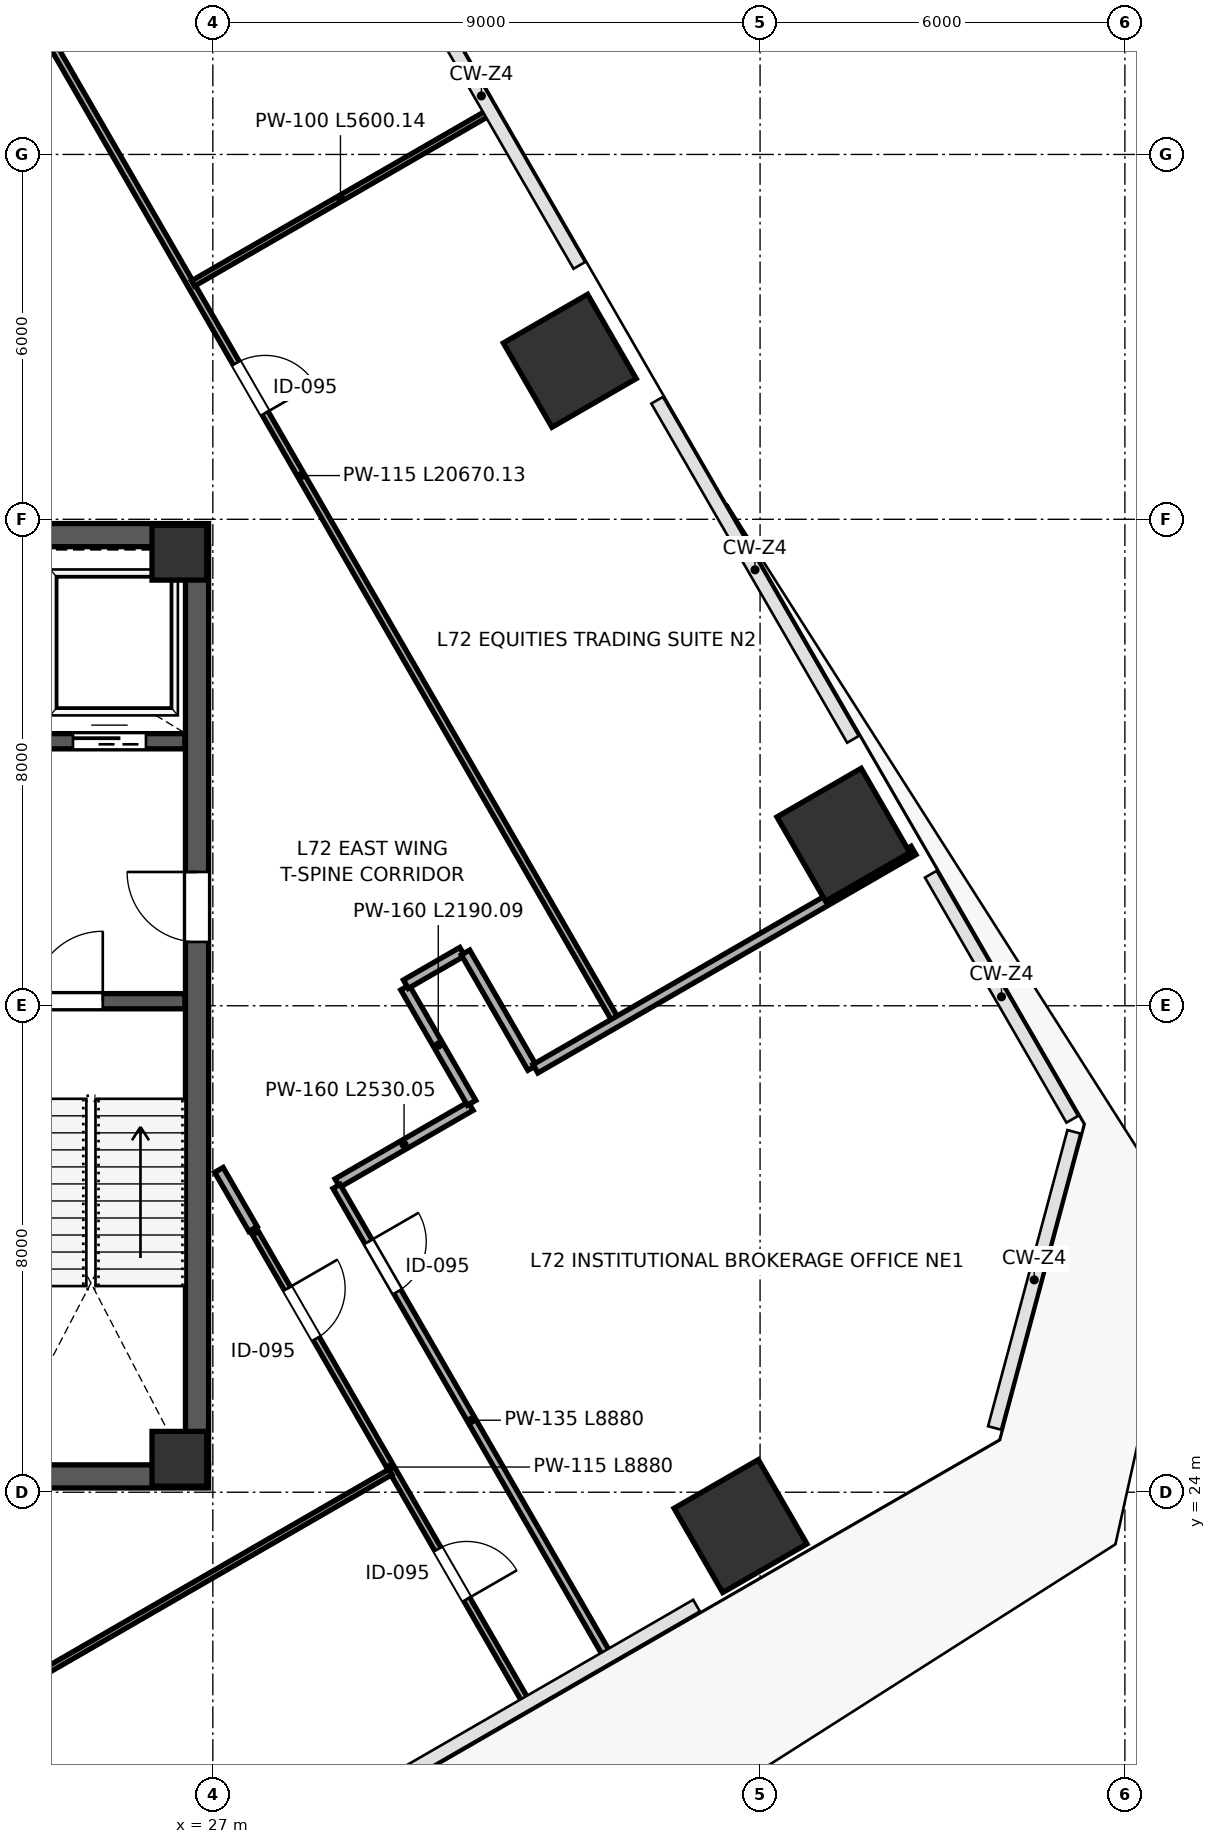
"""IFC4 building model, lengths in metres.
Left out: names, types, materials, properties, quantities, classifications, styles, units other than length and angle.
Written with IfcOpenShell. Run it as: python <this file> out.ifc"""

import sys

from ifc_helpers import new_model, si_unit, direction, frame, frame_2d, origin, origin_2d, place, context, subcontext, project, spatial, rectangle, extrude, source, transform, mapped, element, fill, save


model = new_model("IFC4")
c1 = context("Model", 3, precision=1e-05, world=origin(), true_north=direction((0.0, 1.0)))
c2 = subcontext(c1, "Body", "Model", "MODEL_VIEW")
j1 = project(units=[si_unit("LENGTHUNIT", "METRE"), si_unit("PLANEANGLEUNIT", "RADIAN")], contexts=[c1])
p1 = place(None, origin())
s1 = spatial("IfcSite", under=j1, at=p1, CompositionType="ELEMENT")
p2 = place(p1, origin())
s2 = spatial("IfcBuilding", under=s1, at=p2, CompositionType="ELEMENT")
p3 = place(p2, frame((0.0, 0.0, 319.8)))
s3 = spatial("IfcBuildingStorey", under=s2, at=p3, CompositionType="ELEMENT", Elevation=319.8)
m1 = source(origin(), c2, "Body", "SweptSolid", [
    extrude(rectangle(XDim=0.9, YDim=0.9, at=origin_2d()), origin(), (0.0, 0.0, 1.0), 4.198),
])
for number, where, z_axis, x_axis in (
    (1, (26.45, 24.55, 0.001), (0.0, 0.0, 1.0), (1.0, 0.0, 0.0)),
    (2, (26.45, 39.45, 0.001), (0.0, 0.0, 1.0), (1.0, 0.0, 0.0)),
):
    element("IfcColumn", number, at=place(p3, frame(where, z_axis=z_axis, x_axis=x_axis)), inside=s3, PredefinedType="COLUMN", context=c2, shape_type="MappedRepresentation", body=[
        mapped(m1, transform((0.0, 0.0, 0.0), scale=1.0)),
    ])
m2 = source(origin(), c2, "Body", "SweptSolid", [
    extrude(rectangle(XDim=1.6, YDim=1.6, at=origin_2d()), origin(), (0.0, 0.0, 1.0), 4.198),
])
for number, where, z_axis, x_axis in (
    (3, (32.87, 42.606, 0.001), (0.0, 0.0, 1.0), (-0.5, 0.866, 0.0)),
    (4, (37.37, 34.812, 0.001), (0.0, 0.0, 1.0), (-0.5, 0.866, 0.0)),
    (5, (35.678, 23.443, 0.001), (0.0, 0.0, 1.0), (-0.5, 0.866, 0.0)),
):
    element("IfcColumn", number, at=place(p3, frame(where, z_axis=z_axis, x_axis=x_axis)), inside=s3, PredefinedType="COLUMN", context=c2, shape_type="MappedRepresentation", body=[
        mapped(m2, transform((0.0, 0.0, 0.0), scale=1.0)),
    ])
p4 = place(p3, frame((26.74, 24.45, 0.0), z_axis=(0.0, 0.0, 1.0), x_axis=(0.0, 1.0, 0.0)))
e6 = element("IfcWall", 6, at=p4, inside=s3, PredefinedType="SHEAR", context=c2, shape_type="SweptSolid", body=[
    extrude(rectangle(XDim=15.1, YDim=0.38, at=frame_2d((7.55, 0.0))), origin(), (0.0, 0.0, 1.0), 3.96),
])
p5 = place(p4, frame((8.6, 0.0, 0.0)))
e7 = element("IfcOpeningElement", 7, at=p5, cuts=e6, PredefinedType="OPENING", context=c2, shape_type="SweptSolid", body=[
    extrude(rectangle(XDim=1.15, YDim=2.2, at=frame_2d((0.575, 1.1))), frame((0.0, 0.2, 0.0), z_axis=(0.0, -1.0, 0.0), x_axis=(1.0, 0.0, 0.0)), (0.0, 0.0, 1.0), 0.4),
])
for number, where, z_axis, x_axis in (
    (8, (9.07, 24.26, 0.0), (0.0, 0.0, 1.0), (1.0, 0.0, 0.0)),
    (9, (9.07, 39.74, 0.0), (0.0, 0.0, 1.0), (1.0, 0.0, 0.0)),
):
    element("IfcWall", number, at=place(p3, frame(where, z_axis=z_axis, x_axis=x_axis)), inside=s3, PredefinedType="SHEAR", context=c2, shape_type="SweptSolid", body=[
        extrude(rectangle(XDim=17.86, YDim=0.38, at=frame_2d((8.93, 0.0))), origin(), (0.0, 0.0, 1.0), 3.96),
    ])
p6 = place(p3, frame((23.19, 32.075, 0.0), z_axis=(0.0, 0.0, 1.0), x_axis=(1.0, 0.0, 0.0)))
e10 = element("IfcWall", 10, at=p6, inside=s3, PredefinedType="SHEAR", context=c2, shape_type="SweptSolid", body=[
    extrude(rectangle(XDim=3.35, YDim=0.25, at=frame_2d((1.675, 0.0))), origin(), (0.0, 0.0, 1.0), 3.96),
])
p7 = place(p6, frame((0.85, 0.0, 0.0)))
e11 = element("IfcOpeningElement", 11, at=p7, cuts=e10, PredefinedType="OPENING", context=c2, shape_type="SweptSolid", body=[
    extrude(rectangle(XDim=1.15, YDim=2.2, at=frame_2d((0.575, 1.1))), frame((0.0, 0.135, 0.0), z_axis=(0.0, -1.0, 0.0), x_axis=(1.0, 0.0, 0.0)), (0.0, 0.0, 1.0), 0.27),
])
p8 = place(p3, frame((21.45, 36.35, 0.0), z_axis=(0.0, 0.0, 1.0), x_axis=(1.0, 0.0, 0.0)))
e12 = element("IfcWall", 12, at=p8, inside=s3, PredefinedType="SHEAR", context=c2, shape_type="SweptSolid", body=[
    extrude(rectangle(XDim=5.09, YDim=0.25, at=frame_2d((2.545, 0.0))), origin(), (0.0, 0.0, 1.0), 3.96),
])
p9 = place(p8, frame((0.7, 0.0, 0.0)))
e13 = element("IfcOpeningElement", 13, at=p9, cuts=e12, PredefinedType="OPENING", context=c2, shape_type="SweptSolid", body=[
    extrude(rectangle(XDim=1.2, YDim=2.2, at=frame_2d((0.6, 1.1))), frame((0.0, 0.135, 0.0), z_axis=(0.0, -1.0, 0.0), x_axis=(1.0, 0.0, 0.0)), (0.0, 0.0, 1.0), 0.27),
])
p10 = place(p8, frame((3.25, 0.0, 0.0)))
e14 = element("IfcOpeningElement", 14, at=p10, cuts=e12, PredefinedType="OPENING", context=c2, shape_type="SweptSolid", body=[
    extrude(rectangle(XDim=1.2, YDim=2.2, at=frame_2d((0.6, 1.1))), frame((0.0, 0.135, 0.0), z_axis=(0.0, -1.0, 0.0), x_axis=(1.0, 0.0, 0.0)), (0.0, 0.0, 1.0), 0.27),
])
p11 = place(p3, frame((27.1, 29.301, 0.0), z_axis=(0.0, 0.0, 1.0), x_axis=(0.499929606556, -0.866066041644, 0.0)))
e15 = element("IfcWall", 15, at=p11, inside=s3, PredefinedType="PARTITIONING", context=c2, shape_type="SweptSolid", body=[
    extrude(rectangle(XDim=1.122, YDim=0.16, at=frame_2d((0.561, 0.0))), origin(), (0.0, 0.0, 1.0), 3.96),
])
p12 = place(p3, frame((23.284, 49.669, 0.0), z_axis=(0.0, 0.0, 1.0), x_axis=(0.500004637929, -0.866022726058, 0.0)))
e16 = element("IfcWall", 16, at=p12, inside=s3, PredefinedType="PARTITIONING", context=c2, shape_type="SweptSolid", body=[
    extrude(rectangle(XDim=20.67, YDim=0.115, at=frame_2d((10.335, 0.0))), origin(), (0.0, 0.0, 1.0), 3.96),
])
p13 = place(p12, frame((1.05, 0.0, 0.0)))
e17 = element("IfcOpeningElement", 17, at=p13, cuts=e16, PredefinedType="OPENING", context=c2, shape_type="SweptSolid", body=[
    extrude(rectangle(XDim=0.95, YDim=2.15, at=frame_2d((0.475, 1.075))), frame((0.0, 0.067, 0.0), z_axis=(0.0, -1.0, 0.0), x_axis=(1.0, 0.0, 0.0)), (0.0, 0.0, 1.0), 0.135),
])
p14 = place(p12, frame((8.2, 0.0, 0.0)))
e18 = element("IfcOpeningElement", 18, at=p14, cuts=e16, PredefinedType="OPENING", context=c2, shape_type="SweptSolid", body=[
    extrude(rectangle(XDim=0.95, YDim=2.15, at=frame_2d((0.475, 1.075))), frame((0.0, 0.067, 0.0), z_axis=(0.0, -1.0, 0.0), x_axis=(1.0, 0.0, 0.0)), (0.0, 0.0, 1.0), 0.135),
])
p15 = place(p3, frame((26.674, 43.878, 0.0), z_axis=(0.0, 0.0, 1.0), x_axis=(0.866026594901, 0.49999793692, 0.0)))
e19 = element("IfcWall", 19, at=p15, inside=s3, PredefinedType="PARTITIONING", context=c2, shape_type="SweptSolid", body=[
    extrude(rectangle(XDim=5.6, YDim=0.1, at=frame_2d((2.8, 0.0))), origin(), (0.0, 0.0, 1.0), 3.295),
])
p16 = place(p3, frame((2.506, 37.719, 0.0), z_axis=(0.0, 0.0, 1.0), x_axis=(0.866023290802, 0.500003659775, 0.0)))
e20 = element("IfcWall", 20, at=p16, inside=s3, PredefinedType="PARTITIONING", context=c2, shape_type="SweptSolid", body=[
    extrude(rectangle(XDim=29.61, YDim=0.115, at=frame_2d((14.805, 0.0))), origin(), (0.0, 0.0, 1.0), 3.96),
])
p17 = place(p16, frame((2.1, 0.0, 0.0)))
e21 = element("IfcOpeningElement", 21, at=p17, cuts=e20, PredefinedType="OPENING", context=c2, shape_type="SweptSolid", body=[
    extrude(rectangle(XDim=0.95, YDim=2.15, at=frame_2d((0.475, 1.075))), frame((0.0, 0.067, 0.0), z_axis=(0.0, -1.0, 0.0), x_axis=(1.0, 0.0, 0.0)), (0.0, 0.0, 1.0), 0.135),
])
p18 = place(p16, frame((11.8, 0.0, 0.0)))
e22 = element("IfcOpeningElement", 22, at=p18, cuts=e20, PredefinedType="OPENING", context=c2, shape_type="SweptSolid", body=[
    extrude(rectangle(XDim=0.95, YDim=2.15, at=frame_2d((0.475, 1.075))), frame((0.0, 0.067, 0.0), z_axis=(0.0, -1.0, 0.0), x_axis=(1.0, 0.0, 0.0)), (0.0, 0.0, 1.0), 0.135),
])
p19 = place(p3, frame((29.049, 29.084, 0.0), z_axis=(0.0, 0.0, 1.0), x_axis=(0.866013648801, 0.500020359676, 0.0)))
e23 = element("IfcWall", 23, at=p19, inside=s3, PredefinedType="PARTITIONING", context=c2, shape_type="SweptSolid", body=[
    extrude(rectangle(XDim=2.53, YDim=0.16, at=frame_2d((1.265, 0.0))), origin(), (0.0, 0.0, 1.0), 3.96),
])
p20 = place(p3, frame((30.16, 32.3, 0.0), z_axis=(0.0, 0.0, 1.0), x_axis=(0.499963694393, -0.866046363822, 0.0)))
e24 = element("IfcWall", 24, at=p20, inside=s3, PredefinedType="PARTITIONING", context=c2, shape_type="SweptSolid", body=[
    extrude(rectangle(XDim=2.19, YDim=0.16, at=frame_2d((1.095, 0.0))), origin(), (0.0, 0.0, 1.0), 3.96),
])
p21 = place(p3, frame((30.175, 32.355, 0.0), z_axis=(0.0, 0.0, 1.0), x_axis=(0.866029778435, 0.499992422807, 0.0)))
e25 = element("IfcWall", 25, at=p21, inside=s3, PredefinedType="PARTITIONING", context=c2, shape_type="SweptSolid", body=[
    extrude(rectangle(XDim=1.07, YDim=0.16, at=frame_2d((0.535, 0.0))), origin(), (0.0, 0.0, 1.0), 3.96),
])
p22 = place(p3, frame((31.156, 32.875, 0.0), z_axis=(0.0, 0.0, 1.0), x_axis=(0.499963694393, -0.866046363822, 0.0)))
e26 = element("IfcWall", 26, at=p22, inside=s3, PredefinedType="PARTITIONING", context=c2, shape_type="SweptSolid", body=[
    extrude(rectangle(XDim=2.19, YDim=0.16, at=frame_2d((1.095, 0.0))), origin(), (0.0, 0.0, 1.0), 3.96),
])
p23 = place(p3, frame((32.306, 30.964, 0.0), z_axis=(0.0, 0.0, 1.0), x_axis=(0.866033266336, 0.499986381413, 0.0)))
e27 = element("IfcWall", 27, at=p23, inside=s3, PredefinedType="PARTITIONING", context=c2, shape_type="SweptSolid", body=[
    extrude(rectangle(XDim=7.18, YDim=0.16, at=frame_2d((3.59, 0.0))), origin(), (0.0, 0.0, 1.0), 3.96),
])
p24 = place(p3, frame((29.035, 29.029, 0.0), z_axis=(0.0, 0.0, 1.0), x_axis=(0.500000904628, -0.866024881496, 0.0)))
e28 = element("IfcWall", 28, at=p24, inside=s3, PredefinedType="PARTITIONING", context=c2, shape_type="SweptSolid", body=[
    extrude(rectangle(XDim=8.88, YDim=0.135, at=frame_2d((4.44, 0.0))), origin(), (0.0, 0.0, 1.0), 3.96),
])
p25 = place(p24, frame((1.05, 0.0, 0.0)))
e29 = element("IfcOpeningElement", 29, at=p25, cuts=e28, PredefinedType="OPENING", context=c2, shape_type="SweptSolid", body=[
    extrude(rectangle(XDim=0.95, YDim=2.15, at=frame_2d((0.475, 1.075))), frame((0.0, 0.078, 0.0), z_axis=(0.0, -1.0, 0.0), x_axis=(1.0, 0.0, 0.0)), (0.0, 0.0, 1.0), 0.155),
])
p26 = place(p3, frame((27.701, 28.26, 0.0), z_axis=(0.0, 0.0, 1.0), x_axis=(0.499988999718, -0.866031754707, 0.0)))
e30 = element("IfcWall", 30, at=p26, inside=s3, PredefinedType="PARTITIONING", context=c2, shape_type="SweptSolid", body=[
    extrude(rectangle(XDim=8.88, YDim=0.115, at=frame_2d((4.44, 0.0))), origin(), (0.0, 0.0, 1.0), 3.96),
])
p27 = place(p26, frame((1.05, 0.0, 0.0)))
e31 = element("IfcOpeningElement", 31, at=p27, cuts=e30, PredefinedType="OPENING", context=c2, shape_type="SweptSolid", body=[
    extrude(rectangle(XDim=0.95, YDim=2.15, at=frame_2d((0.475, 1.075))), frame((0.0, 0.067, 0.0), z_axis=(0.0, -1.0, 0.0), x_axis=(1.0, 0.0, 0.0)), (0.0, 0.0, 1.0), 0.135),
])
p28 = place(p26, frame((6.0, 0.0, 0.0)))
e32 = element("IfcOpeningElement", 32, at=p28, cuts=e30, PredefinedType="OPENING", context=c2, shape_type="SweptSolid", body=[
    extrude(rectangle(XDim=0.95, YDim=2.15, at=frame_2d((0.475, 1.075))), frame((0.0, 0.067, 0.0), z_axis=(0.0, -1.0, 0.0), x_axis=(1.0, 0.0, 0.0)), (0.0, 0.0, 1.0), 0.135),
])
p29 = place(p3, frame((13.917, 15.094, 0.0), z_axis=(0.0, 0.0, 1.0), x_axis=(0.86602564517, 0.499999581907, 0.0)))
e33 = element("IfcWall", 33, at=p29, inside=s3, PredefinedType="PARTITIONING", context=c2, shape_type="SweptSolid", body=[
    extrude(rectangle(XDim=18.48, YDim=0.1, at=frame_2d((9.24, 0.0))), origin(), (0.0, 0.0, 1.0), 3.96),
])
m3 = source(origin(), c2, "Body", "SweptSolid", [
    extrude(rectangle(XDim=1.15, YDim=2.2, at=frame_2d((0.575, 1.1))), frame((0.0, 0.025, 0.0), z_axis=(0.0, -1.0, 0.0), x_axis=(1.0, 0.0, 0.0)), (0.0, 0.0, 1.0), 0.05),
])
p30 = place(p7, origin())
e34 = element("IfcDoor", 34, at=p30, inside=s3, OperationType="SINGLE_SWING_RIGHT", PredefinedType="DOOR", context=c2, shape_type="MappedRepresentation", body=[
    mapped(m3, transform((0.0, 0.0, 0.0), scale=1.0)),
])
fill(e11, e34)
m4 = source(origin(), c2, "Body", "SweptSolid", [
    extrude(rectangle(XDim=1.15, YDim=2.2, at=frame_2d((0.575, 1.1))), frame((0.0, 0.025, 0.0), z_axis=(0.0, -1.0, 0.0), x_axis=(1.0, 0.0, 0.0)), (0.0, 0.0, 1.0), 0.05),
])
p31 = place(p5, origin())
e35 = element("IfcDoor", 35, at=p31, inside=s3, OperationType="SINGLE_SWING_RIGHT", PredefinedType="DOOR", context=c2, shape_type="MappedRepresentation", body=[
    mapped(m4, transform((0.0, 0.0, 0.0), scale=1.0)),
])
fill(e7, e35)
m5 = source(origin(), c2, "Body", "SweptSolid", [
    extrude(rectangle(XDim=1.2, YDim=2.2, at=frame_2d((0.6, 1.1))), frame((0.0, 0.025, 0.0), z_axis=(0.0, -1.0, 0.0), x_axis=(1.0, 0.0, 0.0)), (0.0, 0.0, 1.0), 0.05),
])
p32 = place(p10, origin())
e36 = element("IfcDoor", 36, at=p32, inside=s3, OperationType="SLIDING_TO_RIGHT", PredefinedType="DOOR", context=c2, shape_type="MappedRepresentation", body=[
    mapped(m5, transform((0.0, 0.0, 0.0), scale=1.0)),
])
fill(e14, e36)
m6 = source(origin(), c2, "Body", "SweptSolid", [
    extrude(rectangle(XDim=0.95, YDim=2.15, at=frame_2d((0.475, 1.075))), frame((0.0, 0.025, 0.0), z_axis=(0.0, -1.0, 0.0), x_axis=(1.0, 0.0, 0.0)), (0.0, 0.0, 1.0), 0.05),
])
p33 = place(p14, origin())
e37 = element("IfcDoor", 37, at=p33, inside=s3, OperationType="SINGLE_SWING_RIGHT", PredefinedType="DOOR", context=c2, shape_type="MappedRepresentation", body=[
    mapped(m6, transform((0.0, 0.0, 0.0), scale=1.0)),
])
fill(e18, e37)
p34 = place(p25, origin())
e38 = element("IfcDoor", 38, at=p34, inside=s3, OperationType="SINGLE_SWING_LEFT", PredefinedType="DOOR", context=c2, shape_type="MappedRepresentation", body=[
    mapped(m6, transform((0.0, 0.0, 0.0), scale=1.0)),
])
fill(e29, e38)
p35 = place(p27, origin())
e39 = element("IfcDoor", 39, at=p35, inside=s3, OperationType="SINGLE_SWING_LEFT", PredefinedType="DOOR", context=c2, shape_type="MappedRepresentation", body=[
    mapped(m6, transform((0.0, 0.0, 0.0), scale=1.0)),
])
fill(e31, e39)
p36 = place(p28, origin())
e40 = element("IfcDoor", 40, at=p36, inside=s3, OperationType="SINGLE_SWING_RIGHT", PredefinedType="DOOR", context=c2, shape_type="MappedRepresentation", body=[
    mapped(m6, transform((0.0, 0.0, 0.0), scale=1.0)),
])
fill(e32, e40)
save(model, sys.argv[1])
